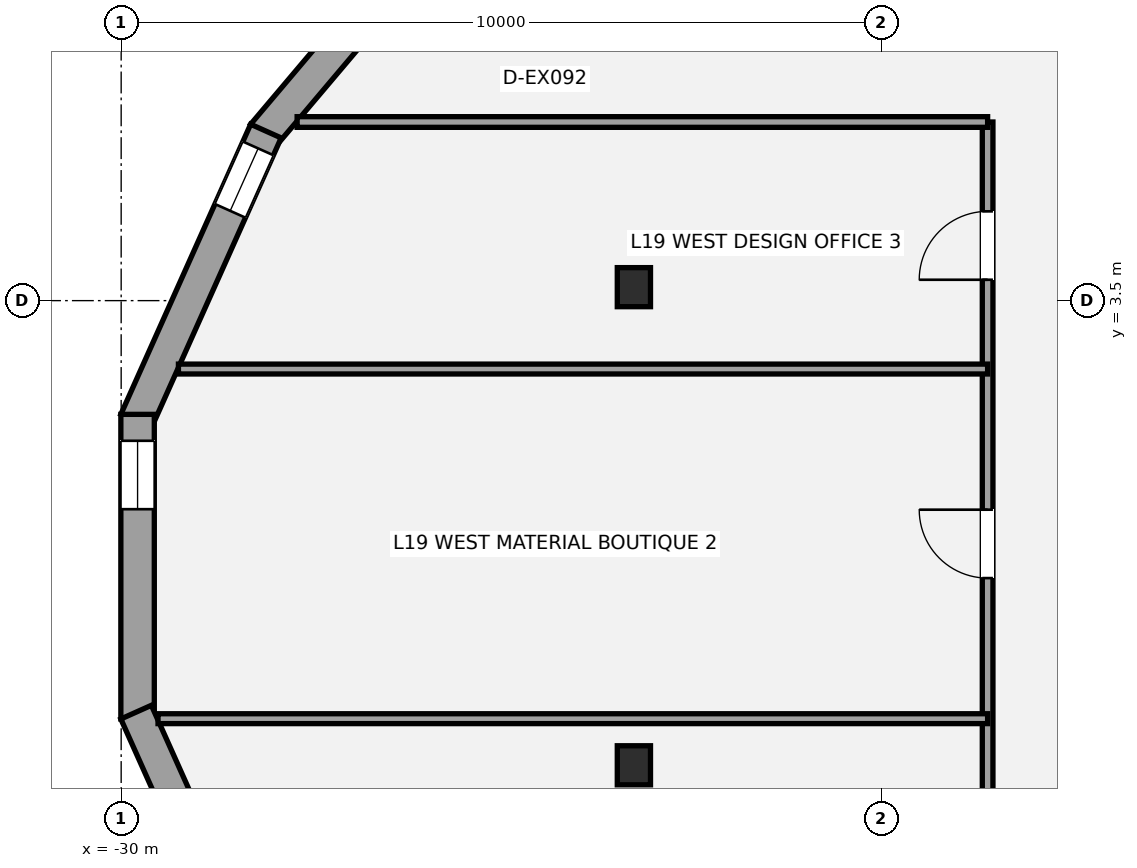
"""IFC4 building model, lengths in metres.
Left out: names, types, materials, properties, quantities, classifications, styles, units other than length and angle.
Written with IfcOpenShell. Run it as: python <this file> out.ifc"""

import sys

from ifc_helpers import new_model, si_unit, direction, frame, frame_2d, origin, origin_2d, place, context, subcontext, project, spatial, rectangle, i_section, extrude, element, fill, save


model = new_model("IFC4")
c1 = context("Model", 3, precision=1e-05, world=origin(), true_north=direction((0.0, 1.0)))
c2 = subcontext(c1, "Body", "Model", "MODEL_VIEW")
j1 = project(units=[si_unit("LENGTHUNIT", "METRE"), si_unit("PLANEANGLEUNIT", "RADIAN")], contexts=[c1])
p1 = place(None, origin())
s1 = spatial("IfcSite", under=j1, at=p1, CompositionType="ELEMENT")
p2 = place(p1, origin())
s2 = spatial("IfcBuilding", under=s1, at=p2, CompositionType="ELEMENT")
p3 = place(p2, frame((0.0, 0.0, 73.8)))
s3 = spatial("IfcBuildingStorey", under=s2, at=p3, CompositionType="ELEMENT", Elevation=73.8)
for number, where, z_axis, x_axis in (
    (1, (-23.254, 3.677, 0.0), (0.0, 0.0, 1.0), (1.0, 0.0, 0.0)),
    (2, (-23.254, -2.613, 0.0), (0.0, 0.0, 1.0), (1.0, 0.0, 0.0)),
):
    element("IfcColumn", number, at=place(p3, frame(where, z_axis=z_axis, x_axis=x_axis)), inside=s3, PredefinedType="COLUMN", context=c2, shape_type="SweptSolid", body=[
        extrude(i_section(OverallWidth=0.437, OverallDepth=0.514, WebThickness=0.061, FlangeThickness=0.097, at=origin_2d()), origin(), (0.0, 0.0, 1.0), 3.6),
    ])
p4 = place(p3, frame((-28.129, 5.678, 0.0), z_axis=(0.0, 0.0, 1.0), x_axis=(0.645698517297, 0.763592446767, 0.0)))
e3 = element("IfcWall", 3, at=p4, inside=s3, PredefinedType="STANDARD", context=c2, shape_type="SweptSolid", body=[
    extrude(rectangle(XDim=4.446, YDim=0.44, at=frame_2d((2.223, 0.0))), origin(), (0.0, 0.0, 1.0), 2.489),
])
p5 = place(p4, frame((3.146, 0.0, 0.58)))
e4 = element("IfcOpeningElement", 4, at=p5, cuts=e3, PredefinedType="OPENING", context=c2, shape_type="SweptSolid", body=[
    extrude(rectangle(XDim=0.9, YDim=1.35, at=frame_2d((0.45, 0.675))), frame((0.0, 0.23, 0.0), z_axis=(0.0, -1.0, 0.0), x_axis=(1.0, 0.0, 0.0)), (0.0, 0.0, 1.0), 0.46),
])
p6 = place(p3, frame((-29.803, 1.914, 0.0), z_axis=(0.0, 0.0, 1.0), x_axis=(0.408380143708, 0.912811951184, 0.0)))
e5 = element("IfcWall", 5, at=p6, inside=s3, PredefinedType="STANDARD", context=c2, shape_type="SweptSolid", body=[
    extrude(rectangle(XDim=4.181, YDim=0.44, at=frame_2d((2.091, 0.0))), origin(), (0.0, 0.0, 1.0), 2.493),
])
p7 = place(p6, frame((3.031, 0.0, 0.92)))
e6 = element("IfcOpeningElement", 6, at=p7, cuts=e5, PredefinedType="OPENING", context=c2, shape_type="SweptSolid", body=[
    extrude(rectangle(XDim=0.9, YDim=1.35, at=frame_2d((0.45, 0.675))), frame((0.0, 0.23, 0.0), z_axis=(0.0, -1.0, 0.0), x_axis=(1.0, 0.0, 0.0)), (0.0, 0.0, 1.0), 0.46),
])
p8 = place(p3, frame((-29.784, -2.004, 0.0), z_axis=(0.0, 0.0, 1.0), x_axis=(0.0, 1.0, 0.0)))
e7 = element("IfcWall", 7, at=p8, inside=s3, PredefinedType="STANDARD", context=c2, shape_type="SweptSolid", body=[
    extrude(rectangle(XDim=4.008, YDim=0.44, at=frame_2d((2.004, 0.0))), origin(), (0.0, 0.0, 1.0), 2.493),
])
p9 = place(p8, frame((2.76, 0.0, 0.58)))
e8 = element("IfcOpeningElement", 8, at=p9, cuts=e7, PredefinedType="OPENING", context=c2, shape_type="SweptSolid", body=[
    extrude(rectangle(XDim=0.9, YDim=1.35, at=frame_2d((0.45, 0.675))), frame((0.0, 0.23, 0.0), z_axis=(0.0, -1.0, 0.0), x_axis=(1.0, 0.0, 0.0)), (0.0, 0.0, 1.0), 0.46),
])
p10 = place(p3, frame((-28.096, -5.731, 0.0), z_axis=(0.0, 0.0, 1.0), x_axis=(-0.408380143708, 0.912811951184, 0.0)))
e9 = element("IfcWall", 9, at=p10, inside=s3, PredefinedType="STANDARD", context=c2, shape_type="SweptSolid", body=[
    extrude(rectangle(XDim=4.181, YDim=0.44, at=frame_2d((2.091, 0.0))), origin(), (0.0, 0.0, 1.0), 2.493),
])
p11 = place(p10, frame((0.2, 0.0, 0.58)))
e10 = element("IfcOpeningElement", 10, at=p11, cuts=e9, PredefinedType="OPENING", context=c2, shape_type="SweptSolid", body=[
    extrude(rectangle(XDim=0.9, YDim=1.35, at=frame_2d((0.45, 0.675))), frame((0.0, 0.23, 0.0), z_axis=(0.0, -1.0, 0.0), x_axis=(1.0, 0.0, 0.0)), (0.0, 0.0, 1.0), 0.46),
])
p12 = place(p3, frame((-18.6, -13.807, 0.0), z_axis=(0.0, 0.0, 1.0), x_axis=(0.0, 1.0, 0.0)))
e11 = element("IfcWall", 11, at=p12, inside=s3, PredefinedType="PARTITIONING", context=c2, shape_type="SweptSolid", body=[
    extrude(rectangle(XDim=19.657, YDim=0.14, at=frame_2d((9.829, 0.0))), origin(), (0.0, 0.0, 1.0), 2.739),
])
p13 = place(p12, frame((8.957, 0.0, 0.0)))
e12 = element("IfcOpeningElement", 12, at=p13, cuts=e11, PredefinedType="OPENING", context=c2, shape_type="SweptSolid", body=[
    extrude(rectangle(XDim=0.9, YDim=2.1, at=frame_2d((0.45, 1.05))), frame((0.0, 0.08, 0.0), z_axis=(0.0, -1.0, 0.0), x_axis=(1.0, 0.0, 0.0)), (0.0, 0.0, 1.0), 0.16),
])
p14 = place(p12, frame((13.656, 0.0, 0.0)))
e13 = element("IfcOpeningElement", 13, at=p14, cuts=e11, PredefinedType="OPENING", context=c2, shape_type="SweptSolid", body=[
    extrude(rectangle(XDim=0.9, YDim=2.1, at=frame_2d((0.45, 1.05))), frame((0.0, 0.08, 0.0), z_axis=(0.0, -1.0, 0.0), x_axis=(1.0, 0.0, 0.0)), (0.0, 0.0, 1.0), 0.16),
])
p15 = place(p12, frame((17.582, 0.0, 0.0)))
e14 = element("IfcOpeningElement", 14, at=p15, cuts=e11, PredefinedType="OPENING", context=c2, shape_type="SweptSolid", body=[
    extrude(rectangle(XDim=0.9, YDim=2.1, at=frame_2d((0.45, 1.05))), frame((0.0, 0.08, 0.0), z_axis=(0.0, -1.0, 0.0), x_axis=(1.0, 0.0, 0.0)), (0.0, 0.0, 1.0), 0.16),
])
p16 = place(p3, frame((-27.685, 5.85, 0.0), z_axis=(0.0, 0.0, 1.0), x_axis=(1.0, 0.0, 0.0)))
e15 = element("IfcWall", 15, at=p16, inside=s3, PredefinedType="PARTITIONING", context=c2, shape_type="SweptSolid", body=[
    extrude(rectangle(XDim=9.085, YDim=0.14, at=frame_2d((4.542, 0.0))), origin(), (0.0, 0.0, 1.0), 2.813),
])
p17 = place(p3, frame((-29.515, -2.0, 0.0), z_axis=(0.0, 0.0, 1.0), x_axis=(1.0, 0.0, 0.0)))
e16 = element("IfcWall", 16, at=p17, inside=s3, PredefinedType="PARTITIONING", context=c2, shape_type="SweptSolid", body=[
    extrude(rectangle(XDim=10.915, YDim=0.13, at=frame_2d((5.458, 0.0))), origin(), (0.0, 0.0, 1.0), 2.801),
])
p18 = place(p3, frame((-29.247, 2.6, 0.0), z_axis=(0.0, 0.0, 1.0), x_axis=(1.0, 0.0, 0.0)))
e17 = element("IfcWall", 17, at=p18, inside=s3, PredefinedType="PARTITIONING", context=c2, shape_type="SweptSolid", body=[
    extrude(rectangle(XDim=10.646, YDim=0.13, at=frame_2d((5.323, 0.0))), origin(), (0.0, 0.0, 1.0), 2.801),
])
p19 = place(p7, origin())
e18 = element("IfcWindow", 18, at=p19, inside=s3, PartitioningType="SINGLE_PANEL", PredefinedType="WINDOW", context=c2, shape_type="SweptSolid", body=[
    extrude(rectangle(XDim=0.9, YDim=1.35, at=frame_2d((0.45, 0.675))), frame((0.0, -0.01, 0.0), z_axis=(0.0, -1.0, 0.0), x_axis=(1.0, 0.0, 0.0)), (0.0, 0.0, 1.0), 0.06),
])
fill(e6, e18)
p20 = place(p9, origin())
e19 = element("IfcWindow", 19, at=p20, inside=s3, PartitioningType="SINGLE_PANEL", PredefinedType="WINDOW", context=c2, shape_type="SweptSolid", body=[
    extrude(rectangle(XDim=0.9, YDim=1.35, at=frame_2d((0.45, 0.675))), frame((0.0, -0.01, 0.0), z_axis=(0.0, -1.0, 0.0), x_axis=(1.0, 0.0, 0.0)), (0.0, 0.0, 1.0), 0.06),
])
fill(e8, e19)
p21 = place(p14, origin())
e20 = element("IfcDoor", 20, at=p21, inside=s3, OperationType="SINGLE_SWING_RIGHT", PredefinedType="DOOR", context=c2, shape_type="SweptSolid", body=[
    extrude(rectangle(XDim=0.9, YDim=2.1, at=frame_2d((0.45, 1.05))), frame((0.0, 0.025, 0.0), z_axis=(0.0, -1.0, 0.0), x_axis=(1.0, 0.0, 0.0)), (0.0, 0.0, 1.0), 0.05),
])
fill(e13, e20)
p22 = place(p15, origin())
e21 = element("IfcDoor", 21, at=p22, inside=s3, OperationType="SINGLE_SWING_LEFT", PredefinedType="DOOR", context=c2, shape_type="SweptSolid", body=[
    extrude(rectangle(XDim=0.9, YDim=2.1, at=frame_2d((0.45, 1.05))), frame((0.0, 0.025, 0.0), z_axis=(0.0, -1.0, 0.0), x_axis=(1.0, 0.0, 0.0)), (0.0, 0.0, 1.0), 0.05),
])
fill(e14, e21)
save(model, sys.argv[1])
